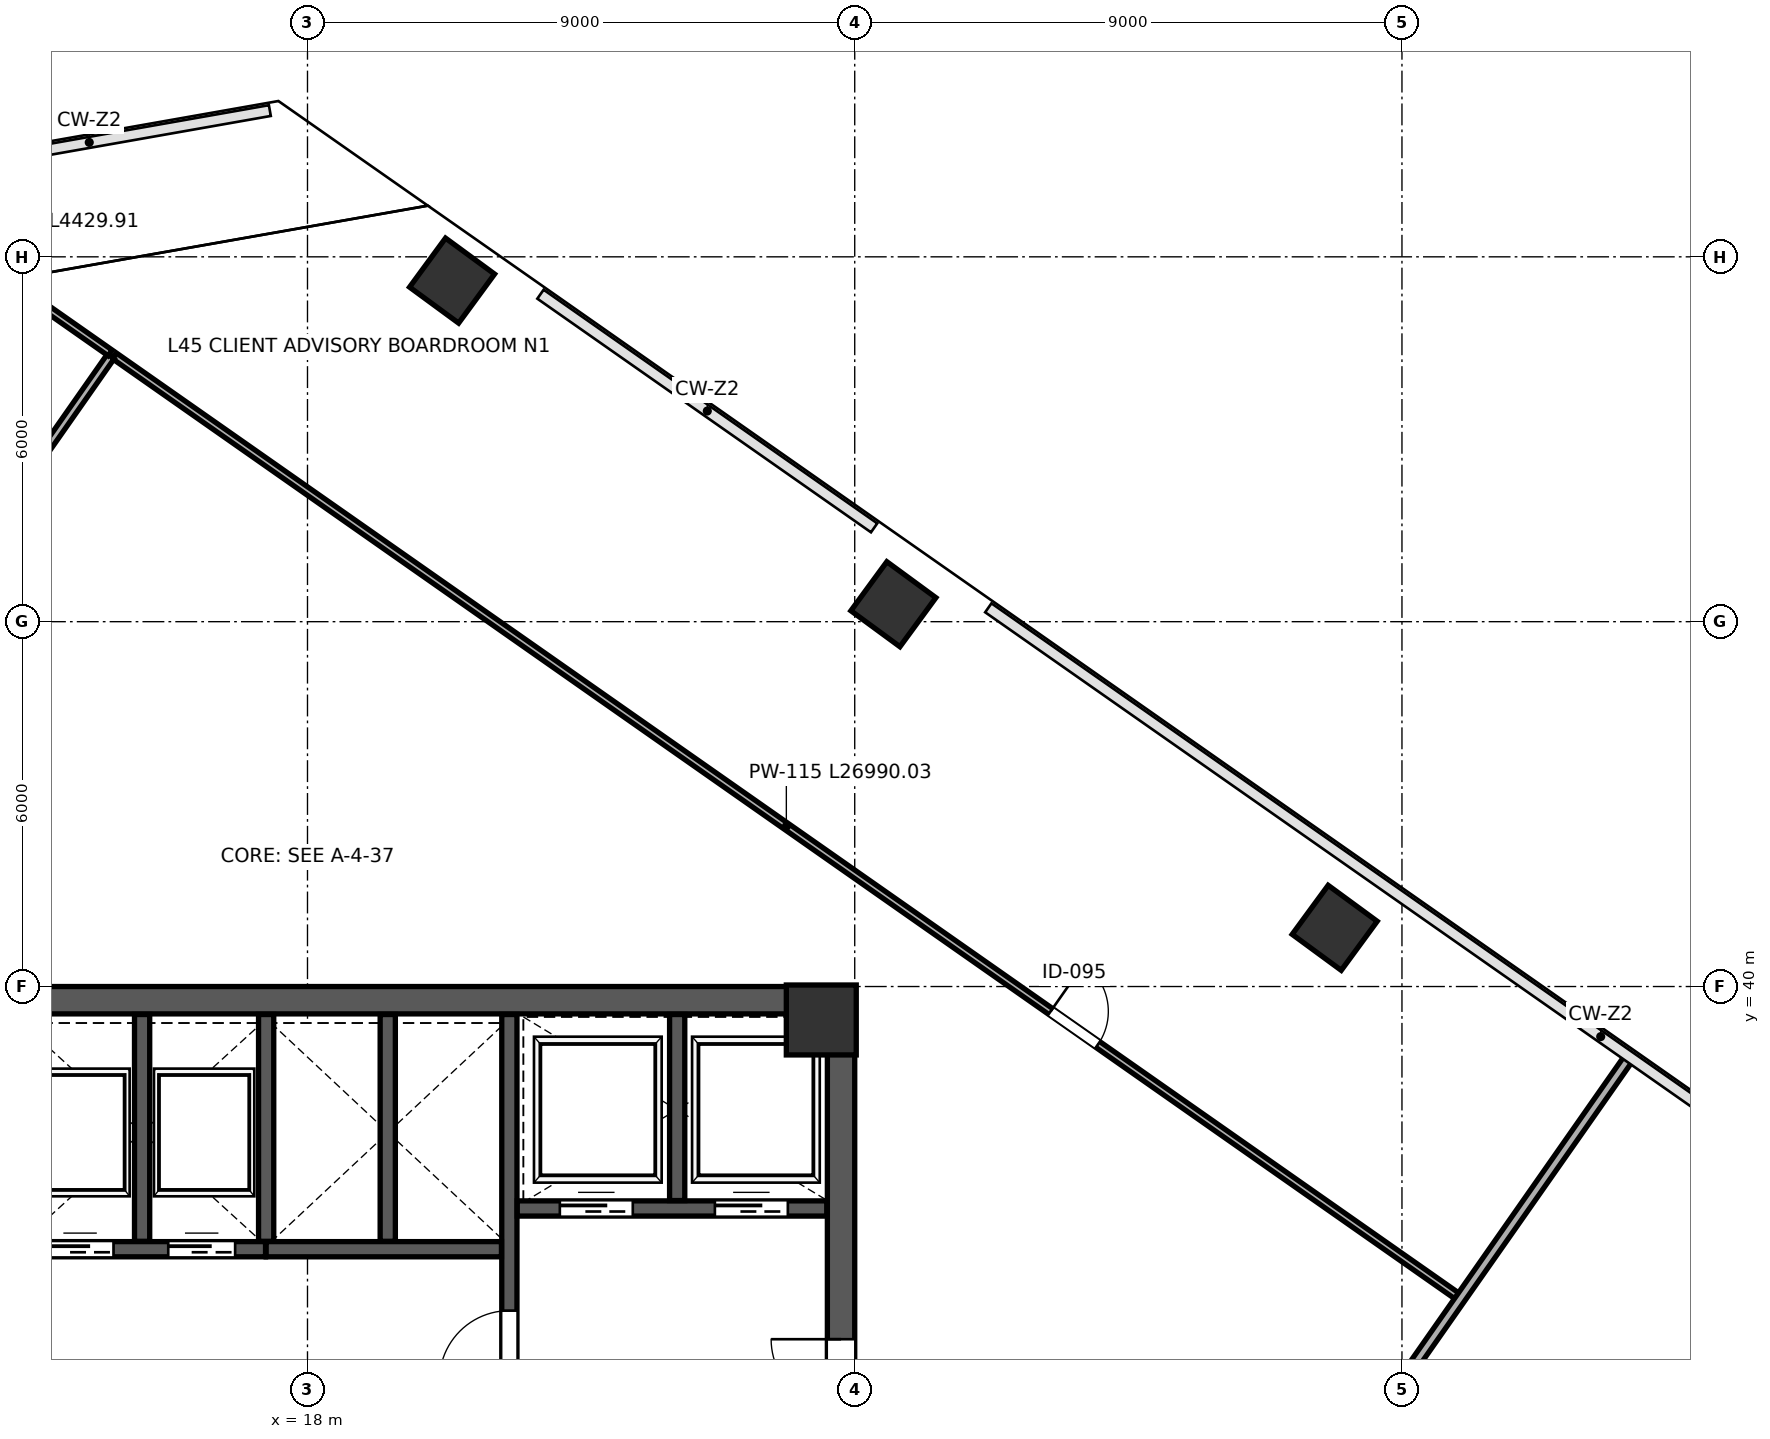
"""IFC4 building model, lengths in metres.
Left out: names, types, materials, properties, quantities, classifications, styles, units other than length and angle.
Written with IfcOpenShell. Run it as: python <this file> out.ifc"""

import sys

from ifc_helpers import new_model, si_unit, direction, frame, frame_2d, origin, origin_2d, place, context, subcontext, project, spatial, rectangle, extrude, clip, halfspace, source, transform, mapped, element, fill, save


model = new_model("IFC4")
c1 = context("Model", 3, precision=1e-05, world=origin(), true_north=direction((0.0, 1.0)))
c2 = subcontext(c1, "Body", "Model", "MODEL_VIEW")
j1 = project(units=[si_unit("LENGTHUNIT", "METRE"), si_unit("PLANEANGLEUNIT", "RADIAN")], contexts=[c1])
p1 = place(None, origin())
s1 = spatial("IfcSite", under=j1, at=p1, CompositionType="ELEMENT")
p2 = place(p1, origin())
s2 = spatial("IfcBuilding", under=s1, at=p2, CompositionType="ELEMENT")
p3 = place(p2, frame((0.0, 0.0, 200.2)))
s3 = spatial("IfcBuildingStorey", under=s2, at=p3, CompositionType="ELEMENT", Elevation=200.2)
m1 = source(origin(), c2, "Body", "SweptSolid", [
    extrude(rectangle(XDim=1.15, YDim=1.15, at=origin_2d()), origin(), (0.0, 0.0, 1.0), 4.198),
])
p4 = place(p3, frame((26.45, 39.45, 0.001), z_axis=(0.0, 0.0, 1.0), x_axis=(1.0, 0.0, 0.0)))
e1 = element("IfcColumn", 1, at=p4, inside=s3, PredefinedType="COLUMN", context=c2, shape_type="MappedRepresentation", body=[
    mapped(m1, transform((0.0, 0.0, 0.0), scale=1.0)),
])
p5 = place(p3, frame((20.378, 51.609, 0.0), z_axis=(0.101431952922, 0.004741972714, 0.99483117795), x_axis=(-0.549951103312, -0.833035772405, 0.060043199939)))
e2 = element("IfcColumn", 2, at=p5, inside=s3, PredefinedType="COLUMN", context=c2, shape_type="Clipping", body=[
    clip(clip(extrude(rectangle(XDim=1.0, YDim=1.0, at=origin_2d()), origin(), (0.0, 0.0, 1.0), 4.222), halfspace(frame((0.0, 0.0, 0.072), z_axis=(0.0, 0.0, -1.0), x_axis=(1.0, 0.0, 0.0)), False)), halfspace(frame((0.0, 0.0, 4.15), z_axis=(0.0, 0.0, 1.0), x_axis=(1.0, 0.0, 0.0)), False)),
])
p6 = place(p3, frame((27.636, 46.287, 0.0), z_axis=(0.073642562456, -0.032562643667, 0.996752951956), x_axis=(-0.865172490896, -0.49920897986, 0.047612555325)))
e3 = element("IfcColumn", 3, at=p6, inside=s3, PredefinedType="COLUMN", context=c2, shape_type="Clipping", body=[
    clip(clip(extrude(rectangle(XDim=1.0, YDim=1.0, at=origin_2d()), origin(), (0.0, 0.0, 1.0), 4.214), halfspace(frame((0.0, 0.0, 0.057), z_axis=(0.0, 0.0, -1.0), x_axis=(1.0, 0.0, 0.0)), False)), halfspace(frame((0.0, 0.0, 4.156), z_axis=(0.0, 0.0, 1.0), x_axis=(1.0, 0.0, 0.0)), False)),
])
p7 = place(p3, frame((34.894, 40.965, 0.0), z_axis=(0.045646375352, -0.06980188109, 0.996515983722), x_axis=(-0.997439527464, 0.051790740691, 0.049316409357)))
e4 = element("IfcColumn", 4, at=p7, inside=s3, PredefinedType="COLUMN", context=c2, shape_type="Clipping", body=[
    clip(clip(extrude(rectangle(XDim=1.0, YDim=1.0, at=origin_2d()), origin(), (0.0, 0.0, 1.0), 4.215), halfspace(frame((0.0, 0.0, 0.059), z_axis=(0.0, 0.0, -1.0), x_axis=(1.0, 0.0, 0.0)), False)), halfspace(frame((0.0, 0.0, 4.155), z_axis=(0.0, 0.0, 1.0), x_axis=(1.0, 0.0, 0.0)), False)),
])
p8 = place(p3, frame((26.775, 24.45, 0.0), z_axis=(0.0, 0.0, 1.0), x_axis=(0.0, 1.0, 0.0)))
e5 = element("IfcWall", 5, at=p8, inside=s3, PredefinedType="SHEAR", context=c2, shape_type="SweptSolid", body=[
    extrude(rectangle(XDim=15.1, YDim=0.45, at=frame_2d((7.55, 0.0))), origin(), (0.0, 0.0, 1.0), 3.96),
])
p9 = place(p8, frame((8.6, 0.0, 0.0)))
e6 = element("IfcOpeningElement", 6, at=p9, cuts=e5, PredefinedType="OPENING", context=c2, shape_type="SweptSolid", body=[
    extrude(rectangle(XDim=1.15, YDim=2.2, at=frame_2d((0.575, 1.1))), frame((0.0, 0.235, 0.0), z_axis=(0.0, -1.0, 0.0), x_axis=(1.0, 0.0, 0.0)), (0.0, 0.0, 1.0), 0.47),
])
p10 = place(p3, frame((9.0, 39.775, 0.0), z_axis=(0.0, 0.0, 1.0), x_axis=(1.0, 0.0, 0.0)))
e7 = element("IfcWall", 7, at=p10, inside=s3, PredefinedType="SHEAR", context=c2, shape_type="SweptSolid", body=[
    extrude(rectangle(XDim=18.0, YDim=0.45, at=frame_2d((9.0, 0.0))), origin(), (0.0, 0.0, 1.0), 3.96),
])
p11 = place(p3, frame((21.32, 32.12, 0.0), z_axis=(0.0, 0.0, 1.0), x_axis=(0.0, 1.0, 0.0)))
e8 = element("IfcWall", 8, at=p11, inside=s3, PredefinedType="SHEAR", context=c2, shape_type="SweptSolid", body=[
    extrude(rectangle(XDim=7.42, YDim=0.25, at=frame_2d((3.71, 0.0))), origin(), (0.0, 0.0, 1.0), 3.96),
])
p12 = place(p11, frame((1.4, 0.0, 0.0)))
e9 = element("IfcOpeningElement", 9, at=p12, cuts=e8, PredefinedType="OPENING", context=c2, shape_type="SweptSolid", body=[
    extrude(rectangle(XDim=1.15, YDim=2.2, at=frame_2d((0.575, 1.1))), frame((0.0, 0.135, 0.0), z_axis=(0.0, -1.0, 0.0), x_axis=(1.0, 0.0, 0.0)), (0.0, 0.0, 1.0), 0.27),
])
p13 = place(p3, frame((21.45, 36.35, 0.0), z_axis=(0.0, 0.0, 1.0), x_axis=(1.0, 0.0, 0.0)))
e10 = element("IfcWall", 10, at=p13, inside=s3, PredefinedType="SHEAR", context=c2, shape_type="SweptSolid", body=[
    extrude(rectangle(XDim=5.09, YDim=0.25, at=frame_2d((2.545, 0.0))), origin(), (0.0, 0.0, 1.0), 3.96),
])
p14 = place(p13, frame((0.7, 0.0, 0.0)))
e11 = element("IfcOpeningElement", 11, at=p14, cuts=e10, PredefinedType="OPENING", context=c2, shape_type="SweptSolid", body=[
    extrude(rectangle(XDim=1.2, YDim=2.2, at=frame_2d((0.6, 1.1))), frame((0.0, 0.135, 0.0), z_axis=(0.0, -1.0, 0.0), x_axis=(1.0, 0.0, 0.0)), (0.0, 0.0, 1.0), 0.27),
])
p15 = place(p13, frame((3.25, 0.0, 0.0)))
e12 = element("IfcOpeningElement", 12, at=p15, cuts=e10, PredefinedType="OPENING", context=c2, shape_type="SweptSolid", body=[
    extrude(rectangle(XDim=1.2, YDim=2.2, at=frame_2d((0.6, 1.1))), frame((0.0, 0.135, 0.0), z_axis=(0.0, -1.0, 0.0), x_axis=(1.0, 0.0, 0.0)), (0.0, 0.0, 1.0), 0.27),
])
p16 = place(p3, frame((24.08, 36.48, 0.0), z_axis=(0.0, 0.0, 1.0), x_axis=(0.0, 1.0, 0.0)))
e13 = element("IfcWall", 13, at=p16, inside=s3, PredefinedType="SHEAR", context=c2, shape_type="SweptSolid", body=[
    extrude(rectangle(XDim=3.06, YDim=0.25, at=frame_2d((1.53, 0.0))), origin(), (0.0, 0.0, 1.0), 3.96),
])
p17 = place(p3, frame((13.06, 35.68, 0.0), z_axis=(0.0, 0.0, 1.0), x_axis=(1.0, 0.0, 0.0)))
e14 = element("IfcWall", 14, at=p17, inside=s3, PredefinedType="SHEAR", context=c2, shape_type="SweptSolid", body=[
    extrude(rectangle(XDim=4.25, YDim=0.25, at=frame_2d((2.125, 0.0))), origin(), (0.0, 0.0, 1.0), 3.96),
])
p18 = place(p17, frame((0.65, 0.0, 0.0)))
e15 = element("IfcOpeningElement", 15, at=p18, cuts=e14, PredefinedType="OPENING", context=c2, shape_type="SweptSolid", body=[
    extrude(rectangle(XDim=1.1, YDim=2.2, at=frame_2d((0.55, 1.1))), frame((0.0, 0.135, 0.0), z_axis=(0.0, -1.0, 0.0), x_axis=(1.0, 0.0, 0.0)), (0.0, 0.0, 1.0), 0.27),
])
p19 = place(p17, frame((2.65, 0.0, 0.0)))
e16 = element("IfcOpeningElement", 16, at=p19, cuts=e14, PredefinedType="OPENING", context=c2, shape_type="SweptSolid", body=[
    extrude(rectangle(XDim=1.1, YDim=2.2, at=frame_2d((0.55, 1.1))), frame((0.0, 0.135, 0.0), z_axis=(0.0, -1.0, 0.0), x_axis=(1.0, 0.0, 0.0)), (0.0, 0.0, 1.0), 0.27),
])
p20 = place(p3, frame((15.28, 35.81, 0.0), z_axis=(0.0, 0.0, 1.0), x_axis=(0.0, 1.0, 0.0)))
e17 = element("IfcWall", 17, at=p20, inside=s3, PredefinedType="SHEAR", context=c2, shape_type="SweptSolid", body=[
    extrude(rectangle(XDim=3.73, YDim=0.25, at=frame_2d((1.865, 0.0))), origin(), (0.0, 0.0, 1.0), 3.96),
])
p21 = place(p3, frame((17.32, 35.68, 0.0), z_axis=(0.0, 0.0, 1.0), x_axis=(1.0, 0.0, 0.0)))
e18 = element("IfcWall", 18, at=p21, inside=s3, PredefinedType="SHEAR", context=c2, shape_type="SweptSolid", body=[
    extrude(rectangle(XDim=3.87, YDim=0.25, at=frame_2d((1.935, 0.0))), origin(), (0.0, 0.0, 1.0), 3.96),
])
for number, where, z_axis, x_axis in (
    (19, (17.32, 35.81, 0.0), (0.0, 0.0, 1.0), (0.0, 1.0, 0.0)),
    (20, (19.32, 35.81, 0.0), (0.0, 0.0, 1.0), (0.0, 1.0, 0.0)),
):
    element("IfcWall", number, at=place(p3, frame(where, z_axis=z_axis, x_axis=x_axis)), inside=s3, PredefinedType="SHEAR", context=c2, shape_type="SweptSolid", body=[
        extrude(rectangle(XDim=3.73, YDim=0.25, at=frame_2d((1.865, 0.0))), origin(), (0.0, 0.0, 1.0), 3.96),
    ])
p22 = place(p3, frame((14.821, 50.374, 0.0), z_axis=(0.0, 0.0, 1.0), x_axis=(0.819153719849, -0.573574043396, 0.0)))
e21 = element("IfcWall", 21, at=p22, inside=s3, PredefinedType="PARTITIONING", context=c2, shape_type="SweptSolid", body=[
    extrude(rectangle(XDim=26.99, YDim=0.115, at=frame_2d((13.495, 0.0))), origin(), (0.0, 0.0, 1.0), 3.96),
])
p23 = place(p22, frame((18.8, 0.0, 0.0)))
e22 = element("IfcOpeningElement", 22, at=p23, cuts=e21, PredefinedType="OPENING", context=c2, shape_type="SweptSolid", body=[
    extrude(rectangle(XDim=0.95, YDim=2.15, at=frame_2d((0.475, 1.075))), frame((0.0, 0.067, 0.0), z_axis=(0.0, -1.0, 0.0), x_axis=(1.0, 0.0, 0.0)), (0.0, 0.0, 1.0), 0.135),
])
p24 = place(p3, frame((1.189, 30.975, 0.0), z_axis=(0.0, 0.0, 1.0), x_axis=(0.573571020786, 0.819155836282, 0.0)))
e23 = element("IfcWall", 23, at=p24, inside=s3, PredefinedType="PARTITIONING", context=c2, shape_type="SweptSolid", body=[
    extrude(rectangle(XDim=23.67, YDim=0.135, at=frame_2d((11.835, 0.0))), origin(), (0.0, 0.0, 1.0), 3.96),
])
p25 = place(p24, frame((2.2, 0.0, 0.0)))
e24 = element("IfcOpeningElement", 24, at=p25, cuts=e23, PredefinedType="OPENING", context=c2, shape_type="SweptSolid", body=[
    extrude(rectangle(XDim=0.95, YDim=2.15, at=frame_2d((0.475, 1.075))), frame((0.0, 0.078, 0.0), z_axis=(0.0, -1.0, 0.0), x_axis=(1.0, 0.0, 0.0)), (0.0, 0.0, 1.0), 0.155),
])
p26 = place(p3, frame((11.127, 52.961, 0.0), z_axis=(0.0, 0.0, 1.0), x_axis=(0.819130930641, -0.573606588584, 0.0)))
e25 = element("IfcWall", 25, at=p26, inside=s3, PredefinedType="PARTITIONING", context=c2, shape_type="SweptSolid", body=[
    extrude(rectangle(XDim=4.43, YDim=0.115, at=frame_2d((2.215, 0.0))), origin(), (0.0, 0.0, 1.0), 3.96),
])
p27 = place(p3, frame((28.336, 22.55, 0.0), z_axis=(0.0, 0.0, 1.0), x_axis=(0.573581263398, 0.819148664333, 0.0)))
e26 = element("IfcWall", 26, at=p27, inside=s3, PredefinedType="PARTITIONING", context=c2, shape_type="SweptSolid", body=[
    extrude(rectangle(XDim=19.84, YDim=0.16, at=frame_2d((9.92, 0.0))), origin(), (0.0, 0.0, 1.0), 3.195),
])
m2 = source(origin(), c2, "Body", "SweptSolid", [
    extrude(rectangle(XDim=1.15, YDim=2.2, at=frame_2d((0.575, 1.1))), frame((0.0, 0.025, 0.0), z_axis=(0.0, -1.0, 0.0), x_axis=(1.0, 0.0, 0.0)), (0.0, 0.0, 1.0), 0.05),
])
p28 = place(p12, origin())
e27 = element("IfcDoor", 27, at=p28, inside=s3, OperationType="SINGLE_SWING_LEFT", PredefinedType="DOOR", context=c2, shape_type="MappedRepresentation", body=[
    mapped(m2, transform((0.0, 0.0, 0.0), scale=1.0)),
])
fill(e9, e27)
p29 = place(p9, origin())
e28 = element("IfcDoor", 28, at=p29, inside=s3, OperationType="SINGLE_SWING_RIGHT", PredefinedType="DOOR", context=c2, shape_type="MappedRepresentation", body=[
    mapped(m2, transform((0.0, 0.0, 0.0), scale=1.0)),
])
fill(e6, e28)
m3 = source(origin(), c2, "Body", "SweptSolid", [
    extrude(rectangle(XDim=1.1, YDim=2.2, at=frame_2d((0.55, 1.1))), frame((0.0, 0.025, 0.0), z_axis=(0.0, -1.0, 0.0), x_axis=(1.0, 0.0, 0.0)), (0.0, 0.0, 1.0), 0.05),
])
p30 = place(p18, origin())
e29 = element("IfcDoor", 29, at=p30, inside=s3, OperationType="SLIDING_TO_LEFT", PredefinedType="DOOR", context=c2, shape_type="MappedRepresentation", body=[
    mapped(m3, transform((0.0, 0.0, 0.0), scale=1.0)),
])
fill(e15, e29)
p31 = place(p19, origin())
e30 = element("IfcDoor", 30, at=p31, inside=s3, OperationType="SLIDING_TO_RIGHT", PredefinedType="DOOR", context=c2, shape_type="MappedRepresentation", body=[
    mapped(m3, transform((0.0, 0.0, 0.0), scale=1.0)),
])
fill(e16, e30)
m4 = source(origin(), c2, "Body", "SweptSolid", [
    extrude(rectangle(XDim=1.2, YDim=2.2, at=frame_2d((0.6, 1.1))), frame((0.0, 0.025, 0.0), z_axis=(0.0, -1.0, 0.0), x_axis=(1.0, 0.0, 0.0)), (0.0, 0.0, 1.0), 0.05),
])
p32 = place(p14, origin())
e31 = element("IfcDoor", 31, at=p32, inside=s3, OperationType="SLIDING_TO_LEFT", PredefinedType="DOOR", context=c2, shape_type="MappedRepresentation", body=[
    mapped(m4, transform((0.0, 0.0, 0.0), scale=1.0)),
])
fill(e11, e31)
p33 = place(p15, origin())
e32 = element("IfcDoor", 32, at=p33, inside=s3, OperationType="SLIDING_TO_RIGHT", PredefinedType="DOOR", context=c2, shape_type="MappedRepresentation", body=[
    mapped(m4, transform((0.0, 0.0, 0.0), scale=1.0)),
])
fill(e12, e32)
m5 = source(origin(), c2, "Body", "SweptSolid", [
    extrude(rectangle(XDim=0.95, YDim=2.15, at=frame_2d((0.475, 1.075))), frame((0.0, 0.025, 0.0), z_axis=(0.0, -1.0, 0.0), x_axis=(1.0, 0.0, 0.0)), (0.0, 0.0, 1.0), 0.05),
])
p34 = place(p23, origin())
e33 = element("IfcDoor", 33, at=p34, inside=s3, OperationType="SINGLE_SWING_LEFT", PredefinedType="DOOR", context=c2, shape_type="MappedRepresentation", body=[
    mapped(m5, transform((0.0, 0.0, 0.0), scale=1.0)),
])
fill(e22, e33)
save(model, sys.argv[1])
